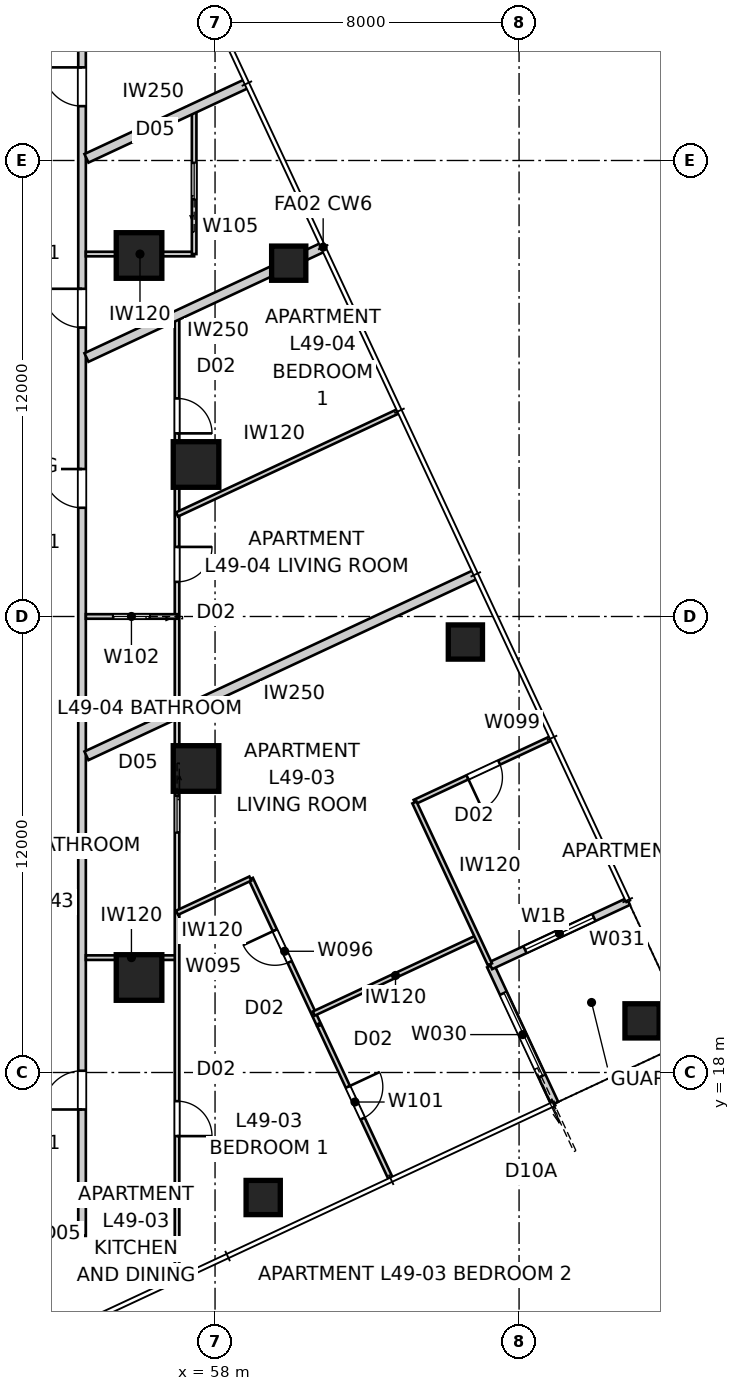
"""IFC4 building model, lengths in metres.
Left out: names, types, materials, properties, quantities, classifications, styles, units other than length and angle.
Written with IfcOpenShell. Run it as: python <this file> out.ifc"""

import sys

from ifc_helpers import new_model, si_unit, direction, frame, frame_2d, origin, origin_2d, place, context, subcontext, project, spatial, rectangle, extrude, element, fill, save


model = new_model("IFC4")
c1 = context("Model", 3, precision=1e-05, world=origin(), true_north=direction((0.0, 1.0)))
c2 = subcontext(c1, "Body", "Model", "MODEL_VIEW")
j1 = project(units=[si_unit("LENGTHUNIT", "METRE"), si_unit("PLANEANGLEUNIT", "RADIAN")], contexts=[c1])
p1 = place(None, origin())
s1 = spatial("IfcSite", under=j1, at=p1, CompositionType="ELEMENT")
p2 = place(p1, origin())
s2 = spatial("IfcBuilding", under=s1, at=p2, CompositionType="ELEMENT")
p3 = place(p2, frame((0.0, 0.0, 179.4)))
s3 = spatial("IfcBuildingStorey", under=s2, at=p3, CompositionType="ELEMENT", Elevation=179.4)
for number, where, z_axis, x_axis in (
    (1, (59.267, 14.71, 0.0), (0.0, 0.0, 1.0), (1.0, 0.0, 0.0)),
    (2, (69.236, 19.359, 0.0), (0.0, 0.0, 1.0), (1.0, 0.0, 0.0)),
    (3, (64.588, 29.328, 0.0), (0.0, 0.0, 1.0), (1.0, 0.0, 0.0)),
    (4, (59.939, 39.298, 0.0), (0.0, 0.0, 1.0), (1.0, 0.0, 0.0)),
):
    element("IfcColumn", number, at=place(p3, frame(where, z_axis=z_axis, x_axis=x_axis)), inside=s3, PredefinedType="COLUMN", context=c2, shape_type="SweptSolid", body=[
        extrude(rectangle(XDim=0.9, YDim=0.9, at=origin_2d()), origin(), (0.0, 0.0, 1.0), 3.4),
    ])
for number, where, z_axis, x_axis in (
    (5, (57.5, 26.0, 0.0), (0.0, 0.0, 1.0), (1.0, 0.0, 0.0)),
    (6, (57.5, 34.0, 0.0), (0.0, 0.0, 1.0), (1.0, 0.0, 0.0)),
    (7, (56.0, 39.5, 0.0), (0.0, 0.0, 1.0), (1.0, 0.0, 0.0)),
    (8, (56.0, 20.5, 0.0), (0.0, 0.0, 1.0), (1.0, 0.0, 0.0)),
):
    element("IfcColumn", number, at=place(p3, frame(where, z_axis=z_axis, x_axis=x_axis)), inside=s3, PredefinedType="COLUMN", context=c2, shape_type="SweptSolid", body=[
        extrude(rectangle(XDim=1.2, YDim=1.2, at=origin_2d()), origin(), (0.0, 0.0, 1.0), 3.4),
    ])
p4 = place(p3, frame((66.94, 17.185, 0.0), z_axis=(0.0, 0.0, 1.0), x_axis=(-0.422658246362, 0.906289140828, 0.0)))
e9 = element("IfcWall", 9, at=p4, inside=s3, PredefinedType="SOLIDWALL", context=c2, shape_type="SweptSolid", body=[
    extrude(rectangle(XDim=4.0, YDim=0.2, at=frame_2d((2.0, 0.0))), origin(), (0.0, 0.0, 1.0), 3.25),
])
p5 = place(p4, frame((0.8, 0.0, 0.0)))
e10 = element("IfcOpeningElement", 10, at=p5, cuts=e9, PredefinedType="OPENING", context=c2, shape_type="SweptSolid", body=[
    extrude(rectangle(XDim=2.4, YDim=2.1, at=frame_2d((1.2, 1.05))), frame((0.0, 0.11, 0.0), z_axis=(0.0, -1.0, 0.0), x_axis=(1.0, 0.0, 0.0)), (0.0, 0.0, 1.0), 0.22),
])
p6 = place(p3, frame((65.25, 20.81, 0.0), z_axis=(0.0, 0.0, 1.0), x_axis=(0.906289140828, 0.422658246362, 0.0)))
e11 = element("IfcWall", 11, at=p6, inside=s3, PredefinedType="SOLIDWALL", context=c2, shape_type="SweptSolid", body=[
    extrude(rectangle(XDim=4.0, YDim=0.2, at=frame_2d((2.0, 0.0))), origin(), (0.0, 0.0, 1.0), 3.25),
])
p7 = place(p6, frame((1.0, 0.0, 0.45)))
e12 = element("IfcOpeningElement", 12, at=p7, cuts=e11, PredefinedType="OPENING", context=c2, shape_type="SweptSolid", body=[
    extrude(rectangle(XDim=2.0, YDim=1.8, at=frame_2d((1.0, 0.9))), frame((0.0, 0.11, 0.0), z_axis=(0.0, -1.0, 0.0), x_axis=(1.0, 0.0, 0.0)), (0.0, 0.0, 1.0), 0.22),
])
p8 = place(p3, frame((49.242, 13.7, 0.0), z_axis=(0.0, 0.0, 1.0), x_axis=(1.0, 0.0, 0.0)))
e13 = element("IfcWall", 13, at=p8, inside=s3, PredefinedType="PARTITIONING", context=c2, shape_type="SweptSolid", body=[
    extrude(rectangle(XDim=5.258, YDim=0.2, at=frame_2d((2.629, 0.0))), origin(), (0.0, 0.0, 1.0), 3.25),
])
p9 = place(p3, frame((54.5, 13.7, 0.0), z_axis=(0.0, 0.0, 1.0), x_axis=(0.0, 1.0, 0.0)))
e14 = element("IfcWall", 14, at=p9, inside=s3, PredefinedType="PARTITIONING", context=c2, shape_type="SweptSolid", body=[
    extrude(rectangle(XDim=32.6, YDim=0.2, at=frame_2d((16.3, 0.0))), origin(), (0.0, 0.0, 1.0), 3.25),
])
p10 = place(p9, frame((3.326, 0.0, 0.0)))
e15 = element("IfcOpeningElement", 15, at=p10, cuts=e14, PredefinedType="OPENING", context=c2, shape_type="SweptSolid", body=[
    extrude(rectangle(XDim=1.02, YDim=2.34, at=frame_2d((0.51, 1.17))), frame((0.0, 0.11, 0.0), z_axis=(0.0, -1.0, 0.0), x_axis=(1.0, 0.0, 0.0)), (0.0, 0.0, 1.0), 0.22),
])
p11 = place(p9, frame((19.161, 0.0, 0.0)))
e16 = element("IfcOpeningElement", 16, at=p11, cuts=e14, PredefinedType="OPENING", context=c2, shape_type="SweptSolid", body=[
    extrude(rectangle(XDim=1.02, YDim=2.34, at=frame_2d((0.51, 1.17))), frame((0.0, 0.11, 0.0), z_axis=(0.0, -1.0, 0.0), x_axis=(1.0, 0.0, 0.0)), (0.0, 0.0, 1.0), 0.22),
])
p12 = place(p9, frame((29.73, 0.0, 0.0)))
e17 = element("IfcOpeningElement", 17, at=p12, cuts=e14, PredefinedType="OPENING", context=c2, shape_type="SweptSolid", body=[
    extrude(rectangle(XDim=1.02, YDim=2.34, at=frame_2d((0.51, 1.17))), frame((0.0, 0.11, 0.0), z_axis=(0.0, -1.0, 0.0), x_axis=(1.0, 0.0, 0.0)), (0.0, 0.0, 1.0), 0.22),
])
p13 = place(p9, frame((23.904, 0.0, 0.0)))
e18 = element("IfcOpeningElement", 18, at=p13, cuts=e14, PredefinedType="OPENING", context=c2, shape_type="SweptSolid", body=[
    extrude(rectangle(XDim=1.02, YDim=2.34, at=frame_2d((0.51, 1.17))), frame((0.0, 0.11, 0.0), z_axis=(0.0, -1.0, 0.0), x_axis=(1.0, 0.0, 0.0)), (0.0, 0.0, 1.0), 0.22),
])
p14 = place(p3, frame((64.86, 31.11, 0.0), z_axis=(0.0, 0.0, 1.0), x_axis=(-0.906306714884, -0.422620560972, 0.0)))
e19 = element("IfcWall", 19, at=p14, inside=s3, PredefinedType="PARTITIONING", context=c2, shape_type="SweptSolid", body=[
    extrude(rectangle(XDim=11.302, YDim=0.25, at=frame_2d((5.651, 0.0))), origin(), (0.0, 0.0, 1.0), 3.25),
])
p15 = place(p3, frame((60.845, 39.72, 0.0), z_axis=(0.0, 0.0, 1.0), x_axis=(-0.90631378723, -0.422605394046, 0.0)))
e20 = element("IfcWall", 20, at=p15, inside=s3, PredefinedType="PARTITIONING", context=c2, shape_type="SweptSolid", body=[
    extrude(rectangle(XDim=6.872, YDim=0.25, at=frame_2d((3.436, 0.0))), origin(), (0.0, 0.0, 1.0), 3.25),
])
p16 = place(p3, frame((58.838, 44.025, 0.0), z_axis=(0.0, 0.0, 1.0), x_axis=(-0.906317010604, -0.422598481173, 0.0)))
e21 = element("IfcWall", 21, at=p16, inside=s3, PredefinedType="PARTITIONING", context=c2, shape_type="SweptSolid", body=[
    extrude(rectangle(XDim=4.657, YDim=0.25, at=frame_2d((2.329, 0.0))), origin(), (0.0, 0.0, 1.0), 3.25),
])
p17 = place(p3, frame((54.6, 21.023, 0.0), z_axis=(0.0, 0.0, 1.0), x_axis=(1.0, 0.0, 0.0)))
e22 = element("IfcWall", 22, at=p17, inside=s3, PredefinedType="PARTITIONING", context=c2, shape_type="SweptSolid", body=[
    extrude(rectangle(XDim=2.4, YDim=0.12, at=frame_2d((1.2, 0.0))), origin(), (0.0, 0.0, 1.0), 3.25),
])
p18 = place(p3, frame((57.0, 37.927, 0.0), z_axis=(0.0, 0.0, 1.0), x_axis=(0.0, -1.0, 0.0)))
e23 = element("IfcWall", 23, at=p18, inside=s3, PredefinedType="PARTITIONING", context=c2, shape_type="SweptSolid", body=[
    extrude(rectangle(XDim=25.333, YDim=0.12, at=frame_2d((12.667, 0.0))), origin(), (0.0, 0.0, 1.0), 2.55),
])
p19 = place(p18, frame((20.681, 0.0, 0.0)))
e24 = element("IfcOpeningElement", 24, at=p19, cuts=e23, PredefinedType="OPENING", context=c2, shape_type="SweptSolid", body=[
    extrude(rectangle(XDim=0.92, YDim=2.34, at=frame_2d((0.46, 1.17))), frame((0.0, 0.07, 0.0), z_axis=(0.0, -1.0, 0.0), x_axis=(1.0, 0.0, 0.0)), (0.0, 0.0, 1.0), 0.14),
])
p20 = place(p18, frame((2.188, 0.0, 0.0)))
e25 = element("IfcOpeningElement", 25, at=p20, cuts=e23, PredefinedType="OPENING", context=c2, shape_type="SweptSolid", body=[
    extrude(rectangle(XDim=0.92, YDim=2.34, at=frame_2d((0.46, 1.17))), frame((0.0, 0.07, 0.0), z_axis=(0.0, -1.0, 0.0), x_axis=(1.0, 0.0, 0.0)), (0.0, 0.0, 1.0), 0.14),
])
p21 = place(p18, frame((6.096, 0.0, 0.0)))
e26 = element("IfcOpeningElement", 26, at=p21, cuts=e23, PredefinedType="OPENING", context=c2, shape_type="SweptSolid", body=[
    extrude(rectangle(XDim=0.92, YDim=2.34, at=frame_2d((0.46, 1.17))), frame((0.0, 0.07, 0.0), z_axis=(0.0, -1.0, 0.0), x_axis=(1.0, 0.0, 0.0)), (0.0, 0.0, 1.0), 0.14),
])
p22 = place(p18, frame((12.65, 0.0, 0.0)))
e27 = element("IfcOpeningElement", 27, at=p22, cuts=e23, PredefinedType="OPENING", context=c2, shape_type="SweptSolid", body=[
    extrude(rectangle(XDim=0.96, YDim=2.1, at=frame_2d((0.48, 1.05))), frame((0.0, 0.07, 0.0), z_axis=(0.0, -1.0, 0.0), x_axis=(1.0, 0.0, 0.0)), (0.0, 0.0, 1.0), 0.14),
])
p23 = place(p3, frame((60.721, 19.282, 0.0), z_axis=(0.0, 0.0, 1.0), x_axis=(-0.422625167194, 0.906304566939, 0.0)))
e28 = element("IfcWall", 28, at=p23, inside=s3, PredefinedType="PARTITIONING", context=c2, shape_type="SweptSolid", body=[
    extrude(rectangle(XDim=4.211, YDim=0.12, at=frame_2d((2.105, 0.0))), origin(), (0.0, 0.0, 1.0), 3.25),
])
p24 = place(p23, frame((1.793, 0.0, 0.0)))
e29 = element("IfcOpeningElement", 29, at=p24, cuts=e28, PredefinedType="OPENING", context=c2, shape_type="SweptSolid", body=[
    extrude(rectangle(XDim=0.92, YDim=2.34, at=frame_2d((0.46, 1.17))), frame((0.0, 0.07, 0.0), z_axis=(0.0, -1.0, 0.0), x_axis=(1.0, 0.0, 0.0)), (0.0, 0.0, 1.0), 0.14),
])
p25 = place(p3, frame((58.928, 23.103, 0.0), z_axis=(0.0, 0.0, 1.0), x_axis=(-0.90630329877, -0.422627886727, 0.0)))
e30 = element("IfcWall", 30, at=p25, inside=s3, PredefinedType="PARTITIONING", context=c2, shape_type="SweptSolid", body=[
    extrude(rectangle(XDim=2.128, YDim=0.12, at=frame_2d((1.064, 0.0))), origin(), (0.0, 0.0, 1.0), 3.25),
])
p26 = place(p3, frame((64.901, 21.558, 0.0), z_axis=(0.0, 0.0, 1.0), x_axis=(-0.906315719442, -0.422601250227, 0.0)))
e31 = element("IfcWall", 31, at=p26, inside=s3, PredefinedType="PARTITIONING", context=c2, shape_type="SweptSolid", body=[
    extrude(rectangle(XDim=4.75, YDim=0.12, at=frame_2d((2.375, 0.0))), origin(), (0.0, 0.0, 1.0), 3.25),
])
p27 = place(p3, frame((66.831, 26.789, 0.0), z_axis=(0.0, 0.0, 1.0), x_axis=(-0.9062952203, -0.422645210149, 0.0)))
e32 = element("IfcWall", 32, at=p27, inside=s3, PredefinedType="PARTITIONING", context=c2, shape_type="SweptSolid", body=[
    extrude(rectangle(XDim=3.95, YDim=0.12, at=frame_2d((1.975, 0.0))), origin(), (0.0, 0.0, 1.0), 3.25),
])
p28 = place(p27, frame((1.495, 0.0, 0.0)))
e33 = element("IfcOpeningElement", 33, at=p28, cuts=e32, PredefinedType="OPENING", context=c2, shape_type="SweptSolid", body=[
    extrude(rectangle(XDim=0.92, YDim=2.34, at=frame_2d((0.46, 1.17))), frame((0.0, 0.07, 0.0), z_axis=(0.0, -1.0, 0.0), x_axis=(1.0, 0.0, 0.0)), (0.0, 0.0, 1.0), 0.14),
])
p29 = place(p3, frame((63.246, 25.106, 0.0), z_axis=(0.0, 0.0, 1.0), x_axis=(0.422632354456, -0.906301215362, 0.0)))
e34 = element("IfcWall", 34, at=p29, inside=s3, PredefinedType="PARTITIONING", context=c2, shape_type="SweptSolid", body=[
    extrude(rectangle(XDim=4.7, YDim=0.12, at=frame_2d((2.35, 0.0))), origin(), (0.0, 0.0, 1.0), 3.25),
])
p30 = place(p3, frame((60.744, 19.233, 0.0), z_axis=(0.0, 0.0, 1.0), x_axis=(0.42260518136, -0.906313886403, 0.0)))
e35 = element("IfcWall", 35, at=p30, inside=s3, PredefinedType="PARTITIONING", context=c2, shape_type="SweptSolid", body=[
    extrude(rectangle(XDim=4.435, YDim=0.12, at=frame_2d((2.218, 0.0))), origin(), (0.0, 0.0, 1.0), 3.25),
])
p31 = place(p30, frame((1.778, 0.0, 0.0)))
e36 = element("IfcOpeningElement", 36, at=p31, cuts=e35, PredefinedType="OPENING", context=c2, shape_type="SweptSolid", body=[
    extrude(rectangle(XDim=0.92, YDim=2.34, at=frame_2d((0.46, 1.17))), frame((0.0, 0.07, 0.0), z_axis=(0.0, -1.0, 0.0), x_axis=(1.0, 0.0, 0.0)), (0.0, 0.0, 1.0), 0.14),
])
p32 = place(p3, frame((57.0, 30.001, 0.0), z_axis=(0.0, 0.0, 1.0), x_axis=(-1.0, 0.0, 0.0)))
e37 = element("IfcWall", 37, at=p32, inside=s3, PredefinedType="PARTITIONING", context=c2, shape_type="SweptSolid", body=[
    extrude(rectangle(XDim=2.4, YDim=0.12, at=frame_2d((1.2, 0.0))), origin(), (0.0, 0.0, 1.0), 2.796),
])
p33 = place(p32, frame((0.72, 0.0, 0.0)))
e38 = element("IfcOpeningElement", 38, at=p33, cuts=e37, PredefinedType="OPENING", context=c2, shape_type="SweptSolid", body=[
    extrude(rectangle(XDim=0.96, YDim=2.1, at=frame_2d((0.48, 1.05))), frame((0.0, 0.07, 0.0), z_axis=(0.0, -1.0, 0.0), x_axis=(1.0, 0.0, 0.0)), (0.0, 0.0, 1.0), 0.14),
])
p34 = place(p3, frame((57.0, 32.686, 0.0), z_axis=(0.0, 0.0, 1.0), x_axis=(0.906305562553, 0.422623032129, 0.0)))
e39 = element("IfcWall", 39, at=p34, inside=s3, PredefinedType="PARTITIONING", context=c2, shape_type="SweptSolid", body=[
    extrude(rectangle(XDim=6.417, YDim=0.12, at=frame_2d((3.209, 0.0))), origin(), (0.0, 0.0, 1.0), 3.25),
])
p35 = place(p3, frame((54.6, 39.538, 0.0), z_axis=(0.0, 0.0, 1.0), x_axis=(1.0, 0.0, 0.0)))
e40 = element("IfcWall", 40, at=p35, inside=s3, PredefinedType="PARTITIONING", context=c2, shape_type="SweptSolid", body=[
    extrude(rectangle(XDim=2.85, YDim=0.12, at=frame_2d((1.425, 0.0))), origin(), (0.0, 0.0, 1.0), 3.25),
])
p36 = place(p3, frame((57.45, 39.538, 0.0), z_axis=(0.0, 0.0, 1.0), x_axis=(0.0, 1.0, 0.0)))
e41 = element("IfcWall", 41, at=p36, inside=s3, PredefinedType="PARTITIONING", context=c2, shape_type="SweptSolid", body=[
    extrude(rectangle(XDim=3.84, YDim=0.12, at=frame_2d((1.92, 0.0))), origin(), (0.0, 0.0, 1.0), 3.25),
])
p37 = place(p36, frame((1.44, 0.0, 0.0)))
e42 = element("IfcOpeningElement", 42, at=p37, cuts=e41, PredefinedType="OPENING", context=c2, shape_type="SweptSolid", body=[
    extrude(rectangle(XDim=0.96, YDim=2.1, at=frame_2d((0.48, 1.05))), frame((0.0, 0.07, 0.0), z_axis=(0.0, -1.0, 0.0), x_axis=(1.0, 0.0, 0.0)), (0.0, 0.0, 1.0), 0.14),
])
p38 = place(p5, origin())
e43 = element("IfcDoor", 43, at=p38, inside=s3, OperationType="SLIDING_TO_LEFT", PredefinedType="DOOR", context=c2, shape_type="SweptSolid", body=[
    extrude(rectangle(XDim=2.4, YDim=2.1, at=frame_2d((1.2, 1.05))), frame((0.0, 0.025, 0.0), z_axis=(0.0, -1.0, 0.0), x_axis=(1.0, 0.0, 0.0)), (0.0, 0.0, 1.0), 0.05),
])
fill(e10, e43)
p39 = place(p7, origin())
e44 = element("IfcWindow", 44, at=p39, inside=s3, PartitioningType="SINGLE_PANEL", PredefinedType="WINDOW", context=c2, shape_type="SweptSolid", body=[
    extrude(rectangle(XDim=2.0, YDim=1.8, at=frame_2d((1.0, 0.9))), frame((0.0, 0.03, 0.0), z_axis=(0.0, -1.0, 0.0), x_axis=(1.0, 0.0, 0.0)), (0.0, 0.0, 1.0), 0.06),
])
fill(e12, e44)
p40 = place(p10, origin())
e45 = element("IfcDoor", 45, at=p40, inside=s3, OperationType="SINGLE_SWING_LEFT", PredefinedType="DOOR", context=c2, shape_type="SweptSolid", body=[
    extrude(rectangle(XDim=1.02, YDim=2.34, at=frame_2d((0.51, 1.17))), frame((0.0, 0.025, 0.0), z_axis=(0.0, -1.0, 0.0), x_axis=(1.0, 0.0, 0.0)), (0.0, 0.0, 1.0), 0.05),
])
fill(e15, e45)
p41 = place(p11, origin())
e46 = element("IfcDoor", 46, at=p41, inside=s3, OperationType="SINGLE_SWING_RIGHT", PredefinedType="DOOR", context=c2, shape_type="SweptSolid", body=[
    extrude(rectangle(XDim=1.02, YDim=2.34, at=frame_2d((0.51, 1.17))), frame((0.0, 0.025, 0.0), z_axis=(0.0, -1.0, 0.0), x_axis=(1.0, 0.0, 0.0)), (0.0, 0.0, 1.0), 0.05),
])
fill(e16, e46)
p42 = place(p12, origin())
e47 = element("IfcDoor", 47, at=p42, inside=s3, OperationType="SINGLE_SWING_RIGHT", PredefinedType="DOOR", context=c2, shape_type="SweptSolid", body=[
    extrude(rectangle(XDim=1.02, YDim=2.34, at=frame_2d((0.51, 1.17))), frame((0.0, 0.025, 0.0), z_axis=(0.0, -1.0, 0.0), x_axis=(1.0, 0.0, 0.0)), (0.0, 0.0, 1.0), 0.05),
])
fill(e17, e47)
p43 = place(p13, origin())
e48 = element("IfcDoor", 48, at=p43, inside=s3, OperationType="SINGLE_SWING_RIGHT", PredefinedType="DOOR", context=c2, shape_type="SweptSolid", body=[
    extrude(rectangle(XDim=1.02, YDim=2.34, at=frame_2d((0.51, 1.17))), frame((0.0, 0.025, 0.0), z_axis=(0.0, -1.0, 0.0), x_axis=(1.0, 0.0, 0.0)), (0.0, 0.0, 1.0), 0.05),
])
fill(e18, e48)
p44 = place(p19, origin())
e49 = element("IfcDoor", 49, at=p44, inside=s3, OperationType="SINGLE_SWING_RIGHT", PredefinedType="DOOR", context=c2, shape_type="SweptSolid", body=[
    extrude(rectangle(XDim=0.92, YDim=2.34, at=frame_2d((0.46, 1.17))), frame((0.0, 0.025, 0.0), z_axis=(0.0, -1.0, 0.0), x_axis=(1.0, 0.0, 0.0)), (0.0, 0.0, 1.0), 0.05),
])
fill(e24, e49)
p45 = place(p20, origin())
e50 = element("IfcDoor", 50, at=p45, inside=s3, OperationType="SINGLE_SWING_RIGHT", PredefinedType="DOOR", context=c2, shape_type="SweptSolid", body=[
    extrude(rectangle(XDim=0.92, YDim=2.34, at=frame_2d((0.46, 1.17))), frame((0.0, 0.025, 0.0), z_axis=(0.0, -1.0, 0.0), x_axis=(1.0, 0.0, 0.0)), (0.0, 0.0, 1.0), 0.05),
])
fill(e25, e50)
p46 = place(p21, origin())
e51 = element("IfcDoor", 51, at=p46, inside=s3, OperationType="SINGLE_SWING_LEFT", PredefinedType="DOOR", context=c2, shape_type="SweptSolid", body=[
    extrude(rectangle(XDim=0.92, YDim=2.34, at=frame_2d((0.46, 1.17))), frame((0.0, 0.025, 0.0), z_axis=(0.0, -1.0, 0.0), x_axis=(1.0, 0.0, 0.0)), (0.0, 0.0, 1.0), 0.05),
])
fill(e26, e51)
p47 = place(p33, origin())
e52 = element("IfcDoor", 52, at=p47, inside=s3, OperationType="SLIDING_TO_LEFT", PredefinedType="DOOR", context=c2, shape_type="SweptSolid", body=[
    extrude(rectangle(XDim=0.96, YDim=2.1, at=frame_2d((0.48, 1.05))), frame((0.0, 0.025, 0.0), z_axis=(0.0, -1.0, 0.0), x_axis=(1.0, 0.0, 0.0)), (0.0, 0.0, 1.0), 0.05),
])
fill(e38, e52)
p48 = place(p37, origin())
e53 = element("IfcDoor", 53, at=p48, inside=s3, OperationType="SLIDING_TO_LEFT", PredefinedType="DOOR", context=c2, shape_type="SweptSolid", body=[
    extrude(rectangle(XDim=0.96, YDim=2.1, at=frame_2d((0.48, 1.05))), frame((0.0, 0.025, 0.0), z_axis=(0.0, -1.0, 0.0), x_axis=(1.0, 0.0, 0.0)), (0.0, 0.0, 1.0), 0.05),
])
fill(e42, e53)
p49 = place(p31, origin())
e54 = element("IfcDoor", 54, at=p49, inside=s3, OperationType="SINGLE_SWING_LEFT", PredefinedType="DOOR", context=c2, shape_type="SweptSolid", body=[
    extrude(rectangle(XDim=0.92, YDim=2.34, at=frame_2d((0.46, 1.17))), frame((0.0, 0.025, 0.0), z_axis=(0.0, -1.0, 0.0), x_axis=(1.0, 0.0, 0.0)), (0.0, 0.0, 1.0), 0.05),
])
fill(e36, e54)
p50 = place(p24, origin())
e55 = element("IfcDoor", 55, at=p50, inside=s3, OperationType="SINGLE_SWING_RIGHT", PredefinedType="DOOR", context=c2, shape_type="SweptSolid", body=[
    extrude(rectangle(XDim=0.92, YDim=2.34, at=frame_2d((0.46, 1.17))), frame((0.0, 0.025, 0.0), z_axis=(0.0, -1.0, 0.0), x_axis=(1.0, 0.0, 0.0)), (0.0, 0.0, 1.0), 0.05),
])
fill(e29, e55)
p51 = place(p22, origin())
e56 = element("IfcDoor", 56, at=p51, inside=s3, OperationType="SLIDING_TO_LEFT", PredefinedType="DOOR", context=c2, shape_type="SweptSolid", body=[
    extrude(rectangle(XDim=0.96, YDim=2.1, at=frame_2d((0.48, 1.05))), frame((0.0, 0.025, 0.0), z_axis=(0.0, -1.0, 0.0), x_axis=(1.0, 0.0, 0.0)), (0.0, 0.0, 1.0), 0.05),
])
fill(e27, e56)
p52 = place(p28, origin())
e57 = element("IfcDoor", 57, at=p52, inside=s3, OperationType="SINGLE_SWING_RIGHT", PredefinedType="DOOR", context=c2, shape_type="SweptSolid", body=[
    extrude(rectangle(XDim=0.92, YDim=2.34, at=frame_2d((0.46, 1.17))), frame((0.0, 0.025, 0.0), z_axis=(0.0, -1.0, 0.0), x_axis=(1.0, 0.0, 0.0)), (0.0, 0.0, 1.0), 0.05),
])
fill(e33, e57)
save(model, sys.argv[1])
